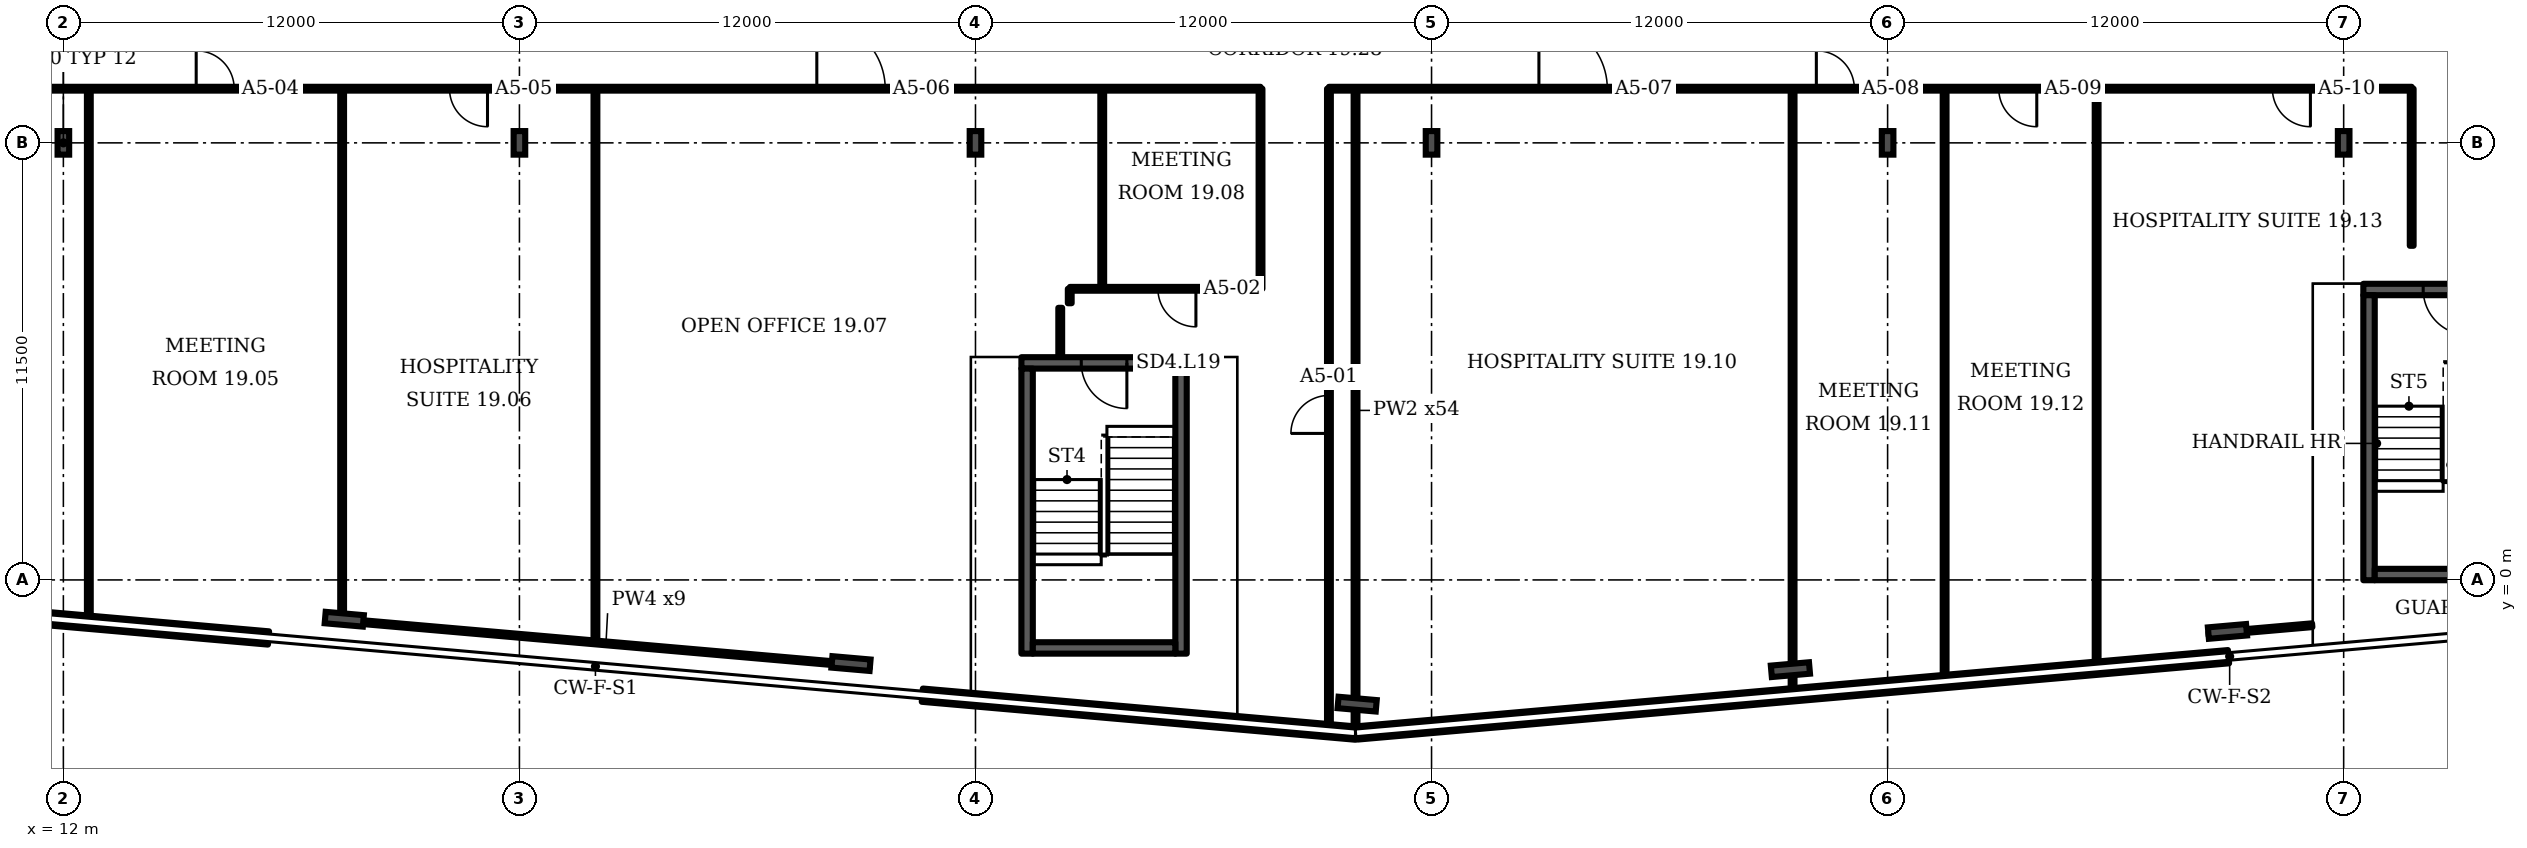
"""IFC4 building model, lengths in metres.
Left out: names, types, materials, properties, quantities, classifications, styles, units other than length and angle.
Written with IfcOpenShell. Run it as: python <this file> out.ifc"""

import sys

from ifc_helpers import new_model, si_unit, direction, frame, frame_2d, origin, origin_2d, place, context, subcontext, project, spatial, rectangle, i_section, extrude, element, fill, save


model = new_model("IFC4")
c1 = context("Model", 3, precision=1e-05, world=origin(), true_north=direction((0.0, 1.0)))
c2 = subcontext(c1, "Body", "Model", "MODEL_VIEW")
j1 = project(units=[si_unit("LENGTHUNIT", "METRE"), si_unit("PLANEANGLEUNIT", "RADIAN")], contexts=[c1])
p1 = place(None, origin())
s1 = spatial("IfcSite", under=j1, at=p1, CompositionType="ELEMENT")
p2 = place(p1, origin())
s2 = spatial("IfcBuilding", under=s1, at=p2, CompositionType="ELEMENT")
p3 = place(p2, frame((0.0, 0.0, 88.3)))
s3 = spatial("IfcBuildingStorey", under=s2, at=p3, CompositionType="ELEMENT", Elevation=88.3)
for number, where, z_axis, x_axis in (
    (1, (19.391, -1.034, 0.0), (0.0, 0.0, 1.0), (-0.087, -0.996, 0.0)),
    (2, (32.724, -2.2, 0.0), (0.0, 0.0, 1.0), (-0.087, -0.996, 0.0)),
    (3, (46.042, -3.268, 0.0), (0.0, 0.0, 1.0), (-0.087, -0.996, 0.0)),
    (4, (57.442, -2.361, 0.0), (0.0, 0.0, 1.0), (0.087, -0.996, 0.0)),
    (5, (68.942, -1.355, 0.0), (0.0, 0.0, 1.0), (0.087, -0.996, 0.0)),
):
    element("IfcColumn", number, at=place(p3, frame(where, z_axis=z_axis, x_axis=x_axis)), inside=s3, PredefinedType="COLUMN", context=c2, shape_type="SweptSolid", body=[
        extrude(i_section(OverallWidth=0.302, OverallDepth=1.008, WebThickness=0.021, FlangeThickness=0.04, FilletRadius=0.03, at=origin_2d()), origin(), (0.0, 0.0, 1.0), 3.6),
    ])
for number, where, z_axis, x_axis in (
    (6, (12.0, 11.5, 0.0), (0.0, 0.0, 1.0), (1.0, 0.0, 0.0)),
    (7, (24.0, 11.5, 0.0), (0.0, 0.0, 1.0), (1.0, 0.0, 0.0)),
    (8, (36.0, 11.5, 0.0), (0.0, 0.0, 1.0), (1.0, 0.0, 0.0)),
    (9, (48.0, 11.5, 0.0), (0.0, 0.0, 1.0), (1.0, 0.0, 0.0)),
    (10, (60.0, 11.5, 0.0), (0.0, 0.0, 1.0), (1.0, 0.0, 0.0)),
    (11, (72.0, 11.5, 0.0), (0.0, 0.0, 1.0), (1.0, 0.0, 0.0)),
):
    element("IfcColumn", number, at=place(p3, frame(where, z_axis=z_axis, x_axis=x_axis)), inside=s3, PredefinedType="COLUMN", context=c2, shape_type="SweptSolid", body=[
        extrude(i_section(OverallWidth=0.305, OverallDepth=0.62, WebThickness=0.021, FlangeThickness=0.04, FilletRadius=0.027, at=origin_2d()), origin(), (0.0, 0.0, 1.0), 3.6),
    ])
p4 = place(p3, frame((5.835, -0.516, 0.0), z_axis=(0.0, 0.0, 1.0), x_axis=(0.996192, -0.087142, 0.0)))
e12 = element("IfcWall", 12, at=p4, inside=s3, PredefinedType="SOLIDWALL", context=c2, shape_type="SweptSolid", body=[
    extrude(rectangle(XDim=11.607, YDim=0.35, at=frame_2d((5.804, 0.0))), origin(), (0.0, 0.0, 1.0), 1.0),
])
p5 = place(p3, frame((34.601, -3.032, 0.0), z_axis=(0.0, 0.0, 1.0), x_axis=(0.996193, -0.087148, 0.0)))
e13 = element("IfcWall", 13, at=p5, inside=s3, PredefinedType="SOLIDWALL", context=c2, shape_type="SweptSolid", body=[
    extrude(rectangle(XDim=11.458, YDim=0.35, at=frame_2d((5.729, 0.0))), origin(), (0.0, 0.0, 1.0), 1.0),
])
p6 = place(p3, frame((46.045, -4.026, 0.0), z_axis=(0.0, 0.0, 1.0), x_axis=(0.99619, 0.087163, 0.0)))
e14 = element("IfcWall", 14, at=p6, inside=s3, PredefinedType="SOLIDWALL", context=c2, shape_type="SweptSolid", body=[
    extrude(rectangle(XDim=23.013, YDim=0.35, at=frame_2d((11.506, 0.0))), origin(), (0.0, 0.0, 1.0), 1.0),
])
p7 = place(p3, frame((37.208, 5.711, 0.0), z_axis=(0.0, 0.0, 1.0), x_axis=(1.0, 0.0, 0.0)))
e15 = element("IfcWall", 15, at=p7, inside=s3, PredefinedType="SHEAR", context=c2, shape_type="SweptSolid", body=[
    extrude(rectangle(XDim=4.35, YDim=0.3, at=frame_2d((2.175, 0.0))), origin(), (0.0, 0.0, 1.0), 3.15),
])
p8 = place(p7, frame((1.575, 0.0, 0.0)))
e16 = element("IfcOpeningElement", 16, at=p8, cuts=e15, PredefinedType="OPENING", context=c2, shape_type="SweptSolid", body=[
    extrude(rectangle(XDim=1.2, YDim=2.1, at=frame_2d((0.6, 1.05))), frame((0.0, 0.16, 0.0), z_axis=(0.0, -1.0, 0.0), x_axis=(1.0, 0.0, 0.0)), (0.0, 0.0, 1.0), 0.32),
])
p9 = place(p3, frame((72.518, 7.642, 0.0), z_axis=(0.0, 0.0, 1.0), x_axis=(1.0, 0.0, 0.0)))
e17 = element("IfcWall", 17, at=p9, inside=s3, PredefinedType="SHEAR", context=c2, shape_type="SweptSolid", body=[
    extrude(rectangle(XDim=4.35, YDim=0.3, at=frame_2d((2.175, 0.0))), origin(), (0.0, 0.0, 1.0), 3.15),
])
p10 = place(p9, frame((1.575, 0.0, 0.0)))
e18 = element("IfcOpeningElement", 18, at=p10, cuts=e17, PredefinedType="OPENING", context=c2, shape_type="SweptSolid", body=[
    extrude(rectangle(XDim=1.2, YDim=2.1, at=frame_2d((0.6, 1.05))), frame((0.0, 0.16, 0.0), z_axis=(0.0, -1.0, 0.0), x_axis=(1.0, 0.0, 0.0)), (0.0, 0.0, 1.0), 0.32),
])
p11 = place(p3, frame((0.02, 12.925, 0.0), z_axis=(0.0, 0.0, 1.0), x_axis=(1.0, 0.0, 0.0)))
e19 = element("IfcWall", 19, at=p11, inside=s3, PredefinedType="PARTITIONING", context=c2, shape_type="SweptSolid", body=[
    extrude(rectangle(XDim=43.48, YDim=0.1, at=frame_2d((21.74, 0.0))), origin(), (0.0, 0.0, 1.0), 3.15),
])
p12 = place(p11, frame((5.405, 0.0, 0.0)))
e20 = element("IfcOpeningElement", 20, at=p12, cuts=e19, PredefinedType="OPENING", context=c2, shape_type="SweptSolid", body=[
    extrude(rectangle(XDim=1.8, YDim=2.1, at=frame_2d((0.9, 1.05))), frame((0.0, 0.06, 0.0), z_axis=(0.0, -1.0, 0.0), x_axis=(1.0, 0.0, 0.0)), (0.0, 0.0, 1.0), 0.12),
])
p13 = place(p11, frame((15.475, 0.0, 0.0)))
e21 = element("IfcOpeningElement", 21, at=p13, cuts=e19, PredefinedType="OPENING", context=c2, shape_type="SweptSolid", body=[
    extrude(rectangle(XDim=1.0, YDim=2.1, at=frame_2d((0.5, 1.05))), frame((0.0, 0.06, 0.0), z_axis=(0.0, -1.0, 0.0), x_axis=(1.0, 0.0, 0.0)), (0.0, 0.0, 1.0), 0.12),
])
p14 = place(p11, frame((22.14, 0.0, 0.0)))
e22 = element("IfcOpeningElement", 22, at=p14, cuts=e19, PredefinedType="OPENING", context=c2, shape_type="SweptSolid", body=[
    extrude(rectangle(XDim=1.0, YDim=2.1, at=frame_2d((0.5, 1.05))), frame((0.0, 0.06, 0.0), z_axis=(0.0, -1.0, 0.0), x_axis=(1.0, 0.0, 0.0)), (0.0, 0.0, 1.0), 0.12),
])
p15 = place(p11, frame((31.805, 0.0, 0.0)))
e23 = element("IfcOpeningElement", 23, at=p15, cuts=e19, PredefinedType="OPENING", context=c2, shape_type="SweptSolid", body=[
    extrude(rectangle(XDim=1.8, YDim=2.1, at=frame_2d((0.9, 1.05))), frame((0.0, 0.06, 0.0), z_axis=(0.0, -1.0, 0.0), x_axis=(1.0, 0.0, 0.0)), (0.0, 0.0, 1.0), 0.12),
])
p16 = place(p3, frame((12.67, -1.088, 0.0), z_axis=(0.0, 0.0, 1.0), x_axis=(0.0, 1.0, 0.0)))
e24 = element("IfcWall", 24, at=p16, inside=s3, PredefinedType="PARTITIONING", context=c2, shape_type="SweptSolid", body=[
    extrude(rectangle(XDim=14.013, YDim=0.1, at=frame_2d((7.007, 0.0))), origin(), (0.0, 0.0, 1.0), 3.15),
])
p17 = place(p3, frame((19.335, -1.06, 0.0), z_axis=(0.0, 0.0, 1.0), x_axis=(0.0, 1.0, 0.0)))
e25 = element("IfcWall", 25, at=p17, inside=s3, PredefinedType="PARTITIONING", context=c2, shape_type="SweptSolid", body=[
    extrude(rectangle(XDim=13.985, YDim=0.1, at=frame_2d((6.993, 0.0))), origin(), (0.0, 0.0, 1.0), 3.15),
])
p18 = place(p3, frame((26.0, -1.645, 0.0), z_axis=(0.0, 0.0, 1.0), x_axis=(0.0, 1.0, 0.0)))
e26 = element("IfcWall", 26, at=p18, inside=s3, PredefinedType="PARTITIONING", context=c2, shape_type="SweptSolid", body=[
    extrude(rectangle(XDim=14.57, YDim=0.1, at=frame_2d((7.285, 0.0))), origin(), (0.0, 0.0, 1.0), 3.15),
])
p19 = place(p3, frame((33.22, -2.275, 0.0), z_axis=(0.0, 0.0, 1.0), x_axis=(-0.996218, 0.086914, 0.0)))
e27 = element("IfcWall", 27, at=p19, inside=s3, PredefinedType="PARTITIONING", context=c2, shape_type="SweptSolid", body=[
    extrude(rectangle(XDim=13.938, YDim=0.1, at=frame_2d((6.969, 0.0))), origin(), (0.0, 0.0, 1.0), 2.53),
])
p20 = place(p3, frame((38.23, 5.881, 0.0), z_axis=(0.0, 0.0, 1.0), x_axis=(0.0, 1.0, 0.0)))
e28 = element("IfcWall", 28, at=p20, inside=s3, PredefinedType="PARTITIONING", context=c2, shape_type="SweptSolid", body=[
    extrude(rectangle(XDim=1.279, YDim=0.1, at=frame_2d((0.64, 0.0))), origin(), (0.0, 0.0, 1.0), 3.15),
])
p21 = place(p3, frame((38.48, 7.28, 0.0), z_axis=(0.0, 0.0, 1.0), x_axis=(0.0, 1.0, 0.0)))
e29 = element("IfcWall", 29, at=p21, inside=s3, PredefinedType="PARTITIONING", context=c2, shape_type="SweptSolid", body=[
    extrude(rectangle(XDim=0.38, YDim=0.1, at=frame_2d((0.19, 0.0))), origin(), (0.0, 0.0, 1.0), 3.15),
])
p22 = place(p3, frame((38.485, 7.66, 0.0), z_axis=(0.0, 0.0, 1.0), x_axis=(1.0, 0.0, 0.0)))
e30 = element("IfcWall", 30, at=p22, inside=s3, PredefinedType="PARTITIONING", context=c2, shape_type="SweptSolid", body=[
    extrude(rectangle(XDim=5.015, YDim=0.1, at=frame_2d((2.507, 0.0))), origin(), (0.0, 0.0, 1.0), 3.15),
])
p23 = place(p22, frame((2.315, 0.0, 0.0)))
e31 = element("IfcOpeningElement", 31, at=p23, cuts=e30, PredefinedType="OPENING", context=c2, shape_type="SweptSolid", body=[
    extrude(rectangle(XDim=1.0, YDim=2.1, at=frame_2d((0.5, 1.05))), frame((0.0, 0.06, 0.0), z_axis=(0.0, -1.0, 0.0), x_axis=(1.0, 0.0, 0.0)), (0.0, 0.0, 1.0), 0.12),
])
for number, where, z_axis, x_axis in (
    (32, (39.335, 7.66, 0.0), (0.0, 0.0, 1.0), (0.0, 1.0, 0.0)),
    (33, (43.5, 7.66, 0.0), (0.0, 0.0, 1.0), (0.0, 1.0, 0.0)),
):
    element("IfcWall", number, at=place(p3, frame(where, z_axis=z_axis, x_axis=x_axis)), inside=s3, PredefinedType="PARTITIONING", context=c2, shape_type="SweptSolid", body=[
        extrude(rectangle(XDim=5.265, YDim=0.1, at=frame_2d((2.633, 0.0))), origin(), (0.0, 0.0, 1.0), 3.15),
    ])
p24 = place(p3, frame((45.3, -3.943, 0.0), z_axis=(0.0, 0.0, 1.0), x_axis=(0.0, 1.0, 0.0)))
e34 = element("IfcWall", 34, at=p24, inside=s3, PredefinedType="PARTITIONING", context=c2, shape_type="SweptSolid", body=[
    extrude(rectangle(XDim=16.868, YDim=0.1, at=frame_2d((8.434, 0.0))), origin(), (0.0, 0.0, 1.0), 2.53),
])
p25 = place(p24, frame((7.798, 0.0, 0.0)))
e35 = element("IfcOpeningElement", 35, at=p25, cuts=e34, PredefinedType="OPENING", context=c2, shape_type="SweptSolid", body=[
    extrude(rectangle(XDim=1.0, YDim=2.1, at=frame_2d((0.5, 1.05))), frame((0.0, 0.06, 0.0), z_axis=(0.0, -1.0, 0.0), x_axis=(1.0, 0.0, 0.0)), (0.0, 0.0, 1.0), 0.12),
])
p26 = place(p3, frame((45.3, 12.925, 0.0), z_axis=(0.0, 0.0, 1.0), x_axis=(1.0, 0.0, 0.0)))
e36 = element("IfcWall", 36, at=p26, inside=s3, PredefinedType="PARTITIONING", context=c2, shape_type="SweptSolid", body=[
    extrude(rectangle(XDim=28.49, YDim=0.1, at=frame_2d((14.245, 0.0))), origin(), (0.0, 0.0, 1.0), 3.15),
])
p27 = place(p26, frame((5.525, 0.0, 0.0)))
e37 = element("IfcOpeningElement", 37, at=p27, cuts=e36, PredefinedType="OPENING", context=c2, shape_type="SweptSolid", body=[
    extrude(rectangle(XDim=1.8, YDim=2.1, at=frame_2d((0.9, 1.05))), frame((0.0, 0.06, 0.0), z_axis=(0.0, -1.0, 0.0), x_axis=(1.0, 0.0, 0.0)), (0.0, 0.0, 1.0), 0.12),
])
p28 = place(p26, frame((12.825, 0.0, 0.0)))
e38 = element("IfcOpeningElement", 38, at=p28, cuts=e36, PredefinedType="OPENING", context=c2, shape_type="SweptSolid", body=[
    extrude(rectangle(XDim=1.0, YDim=2.1, at=frame_2d((0.5, 1.05))), frame((0.0, 0.06, 0.0), z_axis=(0.0, -1.0, 0.0), x_axis=(1.0, 0.0, 0.0)), (0.0, 0.0, 1.0), 0.12),
])
p29 = place(p26, frame((17.625, 0.0, 0.0)))
e39 = element("IfcOpeningElement", 39, at=p29, cuts=e36, PredefinedType="OPENING", context=c2, shape_type="SweptSolid", body=[
    extrude(rectangle(XDim=1.0, YDim=2.1, at=frame_2d((0.5, 1.05))), frame((0.0, 0.06, 0.0), z_axis=(0.0, -1.0, 0.0), x_axis=(1.0, 0.0, 0.0)), (0.0, 0.0, 1.0), 0.12),
])
p30 = place(p26, frame((24.825, 0.0, 0.0)))
e40 = element("IfcOpeningElement", 40, at=p30, cuts=e36, PredefinedType="OPENING", context=c2, shape_type="SweptSolid", body=[
    extrude(rectangle(XDim=1.0, YDim=2.1, at=frame_2d((0.5, 1.05))), frame((0.0, 0.06, 0.0), z_axis=(0.0, -1.0, 0.0), x_axis=(1.0, 0.0, 0.0)), (0.0, 0.0, 1.0), 0.12),
])
p31 = place(p3, frame((46.0, -4.004, 0.0), z_axis=(0.0, 0.0, 1.0), x_axis=(0.0, 1.0, 0.0)))
e41 = element("IfcWall", 41, at=p31, inside=s3, PredefinedType="PARTITIONING", context=c2, shape_type="SweptSolid", body=[
    extrude(rectangle(XDim=16.929, YDim=0.1, at=frame_2d((8.465, 0.0))), origin(), (0.0, 0.0, 1.0), 3.15),
])
p32 = place(p3, frame((57.5, -2.998, 0.0), z_axis=(0.0, 0.0, 1.0), x_axis=(0.0, 1.0, 0.0)))
e42 = element("IfcWall", 42, at=p32, inside=s3, PredefinedType="PARTITIONING", context=c2, shape_type="SweptSolid", body=[
    extrude(rectangle(XDim=15.923, YDim=0.1, at=frame_2d((7.962, 0.0))), origin(), (0.0, 0.0, 1.0), 3.15),
])
p33 = place(p3, frame((61.5, -2.648, 0.0), z_axis=(0.0, 0.0, 1.0), x_axis=(0.0, 1.0, 0.0)))
e43 = element("IfcWall", 43, at=p33, inside=s3, PredefinedType="PARTITIONING", context=c2, shape_type="SweptSolid", body=[
    extrude(rectangle(XDim=15.573, YDim=0.1, at=frame_2d((7.787, 0.0))), origin(), (0.0, 0.0, 1.0), 2.53),
])
p34 = place(p3, frame((65.5, -2.298, 0.0), z_axis=(0.0, 0.0, 1.0), x_axis=(0.0, 1.0, 0.0)))
e44 = element("IfcWall", 44, at=p34, inside=s3, PredefinedType="PARTITIONING", context=c2, shape_type="SweptSolid", body=[
    extrude(rectangle(XDim=15.223, YDim=0.1, at=frame_2d((7.612, 0.0))), origin(), (0.0, 0.0, 1.0), 2.53),
])
p35 = place(p3, frame((68.445, -1.43, 0.0), z_axis=(0.0, 0.0, 1.0), x_axis=(0.996195, 0.087118, 0.0)))
e45 = element("IfcWall", 45, at=p35, inside=s3, PredefinedType="PARTITIONING", context=c2, shape_type="SweptSolid", body=[
    extrude(rectangle(XDim=2.738, YDim=0.1, at=frame_2d((1.369, 0.0))), origin(), (0.0, 0.0, 1.0), 2.53),
])
p36 = place(p3, frame((73.79, 8.792, 0.0), z_axis=(0.0, 0.0, 1.0), x_axis=(0.0, 1.0, 0.0)))
e46 = element("IfcWall", 46, at=p36, inside=s3, PredefinedType="PARTITIONING", context=c2, shape_type="SweptSolid", body=[
    extrude(rectangle(XDim=4.133, YDim=0.1, at=frame_2d((2.066, 0.0))), origin(), (0.0, 0.0, 1.0), 3.15),
])
for number, where, z_axis, x_axis in (
    (47, (37.358, -1.939, 0.0), (0.0, 0.0, 1.0), (0.0, 1.0, 0.0)),
    (48, (41.408, -1.939, 0.0), (0.0, 0.0, 1.0), (0.0, 1.0, 0.0)),
):
    element("IfcWall", number, at=place(p3, frame(where, z_axis=z_axis, x_axis=x_axis)), inside=s3, PredefinedType="SHEAR", context=c2, shape_type="SweptSolid", body=[
        extrude(rectangle(XDim=7.5, YDim=0.3, at=frame_2d((3.75, 0.0))), origin(), (0.0, 0.0, 1.0), 3.15),
    ])
p37 = place(p3, frame((37.508, -1.789, 0.0), z_axis=(0.0, 0.0, 1.0), x_axis=(1.0, 0.0, 0.0)))
e49 = element("IfcWall", 49, at=p37, inside=s3, PredefinedType="SHEAR", context=c2, shape_type="SweptSolid", body=[
    extrude(rectangle(XDim=3.75, YDim=0.3, at=frame_2d((1.875, 0.0))), origin(), (0.0, 0.0, 1.0), 3.15),
])
p38 = place(p3, frame((72.667, -0.008, 0.0), z_axis=(0.0, 0.0, 1.0), x_axis=(0.0, 1.0, 0.0)))
e50 = element("IfcWall", 50, at=p38, inside=s3, PredefinedType="SHEAR", context=c2, shape_type="SweptSolid", body=[
    extrude(rectangle(XDim=7.5, YDim=0.3, at=frame_2d((3.75, 0.0))), origin(), (0.0, 0.0, 1.0), 3.15),
])
p39 = place(p3, frame((72.817, 0.142, 0.0), z_axis=(0.0, 0.0, 1.0), x_axis=(1.0, 0.0, 0.0)))
e51 = element("IfcWall", 51, at=p39, inside=s3, PredefinedType="SHEAR", context=c2, shape_type="SweptSolid", body=[
    extrude(rectangle(XDim=3.75, YDim=0.3, at=frame_2d((1.875, 0.0))), origin(), (0.0, 0.0, 1.0), 3.15),
])
p40 = place(p8, origin())
e52 = element("IfcDoor", 52, at=p40, inside=s3, OperationType="SINGLE_SWING_RIGHT", PredefinedType="DOOR", context=c2, shape_type="SweptSolid", body=[
    extrude(rectangle(XDim=1.2, YDim=2.1, at=frame_2d((0.6, 1.05))), frame((0.0, 0.025, 0.0), z_axis=(0.0, -1.0, 0.0), x_axis=(1.0, 0.0, 0.0)), (0.0, 0.0, 1.0), 0.05),
])
fill(e16, e52)
p41 = place(p10, origin())
e53 = element("IfcDoor", 53, at=p41, inside=s3, OperationType="SINGLE_SWING_RIGHT", PredefinedType="DOOR", context=c2, shape_type="SweptSolid", body=[
    extrude(rectangle(XDim=1.2, YDim=2.1, at=frame_2d((0.6, 1.05))), frame((0.0, 0.025, 0.0), z_axis=(0.0, -1.0, 0.0), x_axis=(1.0, 0.0, 0.0)), (0.0, 0.0, 1.0), 0.05),
])
fill(e18, e53)
p42 = place(p25, origin())
e54 = element("IfcDoor", 54, at=p42, inside=s3, OperationType="SINGLE_SWING_LEFT", PredefinedType="DOOR", context=c2, shape_type="SweptSolid", body=[
    extrude(rectangle(XDim=1.0, YDim=2.1, at=frame_2d((0.5, 1.05))), frame((0.0, 0.025, 0.0), z_axis=(0.0, -1.0, 0.0), x_axis=(1.0, 0.0, 0.0)), (0.0, 0.0, 1.0), 0.05),
])
fill(e35, e54)
p43 = place(p23, origin())
e55 = element("IfcDoor", 55, at=p43, inside=s3, OperationType="SINGLE_SWING_RIGHT", PredefinedType="DOOR", context=c2, shape_type="SweptSolid", body=[
    extrude(rectangle(XDim=1.0, YDim=2.1, at=frame_2d((0.5, 1.05))), frame((0.0, 0.025, 0.0), z_axis=(0.0, -1.0, 0.0), x_axis=(1.0, 0.0, 0.0)), (0.0, 0.0, 1.0), 0.05),
])
fill(e31, e55)
p44 = place(p13, origin())
e56 = element("IfcDoor", 56, at=p44, inside=s3, OperationType="SINGLE_SWING_LEFT", PredefinedType="DOOR", context=c2, shape_type="SweptSolid", body=[
    extrude(rectangle(XDim=1.0, YDim=2.1, at=frame_2d((0.5, 1.05))), frame((0.0, 0.025, 0.0), z_axis=(0.0, -1.0, 0.0), x_axis=(1.0, 0.0, 0.0)), (0.0, 0.0, 1.0), 0.05),
])
fill(e21, e56)
p45 = place(p14, origin())
e57 = element("IfcDoor", 57, at=p45, inside=s3, OperationType="SINGLE_SWING_RIGHT", PredefinedType="DOOR", context=c2, shape_type="SweptSolid", body=[
    extrude(rectangle(XDim=1.0, YDim=2.1, at=frame_2d((0.5, 1.05))), frame((0.0, 0.025, 0.0), z_axis=(0.0, -1.0, 0.0), x_axis=(1.0, 0.0, 0.0)), (0.0, 0.0, 1.0), 0.05),
])
fill(e22, e57)
p46 = place(p15, origin())
e58 = element("IfcDoor", 58, at=p46, inside=s3, OperationType="DOUBLE_DOOR_SINGLE_SWING", PredefinedType="DOOR", context=c2, shape_type="SweptSolid", body=[
    extrude(rectangle(XDim=1.8, YDim=2.1, at=frame_2d((0.9, 1.05))), frame((0.0, 0.025, 0.0), z_axis=(0.0, -1.0, 0.0), x_axis=(1.0, 0.0, 0.0)), (0.0, 0.0, 1.0), 0.05),
])
fill(e23, e58)
p47 = place(p27, origin())
e59 = element("IfcDoor", 59, at=p47, inside=s3, OperationType="DOUBLE_DOOR_SINGLE_SWING", PredefinedType="DOOR", context=c2, shape_type="SweptSolid", body=[
    extrude(rectangle(XDim=1.8, YDim=2.1, at=frame_2d((0.9, 1.05))), frame((0.0, 0.025, 0.0), z_axis=(0.0, -1.0, 0.0), x_axis=(1.0, 0.0, 0.0)), (0.0, 0.0, 1.0), 0.05),
])
fill(e37, e59)
p48 = place(p28, origin())
e60 = element("IfcDoor", 60, at=p48, inside=s3, OperationType="SINGLE_SWING_LEFT", PredefinedType="DOOR", context=c2, shape_type="SweptSolid", body=[
    extrude(rectangle(XDim=1.0, YDim=2.1, at=frame_2d((0.5, 1.05))), frame((0.0, 0.025, 0.0), z_axis=(0.0, -1.0, 0.0), x_axis=(1.0, 0.0, 0.0)), (0.0, 0.0, 1.0), 0.05),
])
fill(e38, e60)
p49 = place(p29, origin())
e61 = element("IfcDoor", 61, at=p49, inside=s3, OperationType="SINGLE_SWING_RIGHT", PredefinedType="DOOR", context=c2, shape_type="SweptSolid", body=[
    extrude(rectangle(XDim=1.0, YDim=2.1, at=frame_2d((0.5, 1.05))), frame((0.0, 0.025, 0.0), z_axis=(0.0, -1.0, 0.0), x_axis=(1.0, 0.0, 0.0)), (0.0, 0.0, 1.0), 0.05),
])
fill(e39, e61)
p50 = place(p30, origin())
e62 = element("IfcDoor", 62, at=p50, inside=s3, OperationType="SINGLE_SWING_RIGHT", PredefinedType="DOOR", context=c2, shape_type="SweptSolid", body=[
    extrude(rectangle(XDim=1.0, YDim=2.1, at=frame_2d((0.5, 1.05))), frame((0.0, 0.025, 0.0), z_axis=(0.0, -1.0, 0.0), x_axis=(1.0, 0.0, 0.0)), (0.0, 0.0, 1.0), 0.05),
])
fill(e40, e62)
save(model, sys.argv[1])
